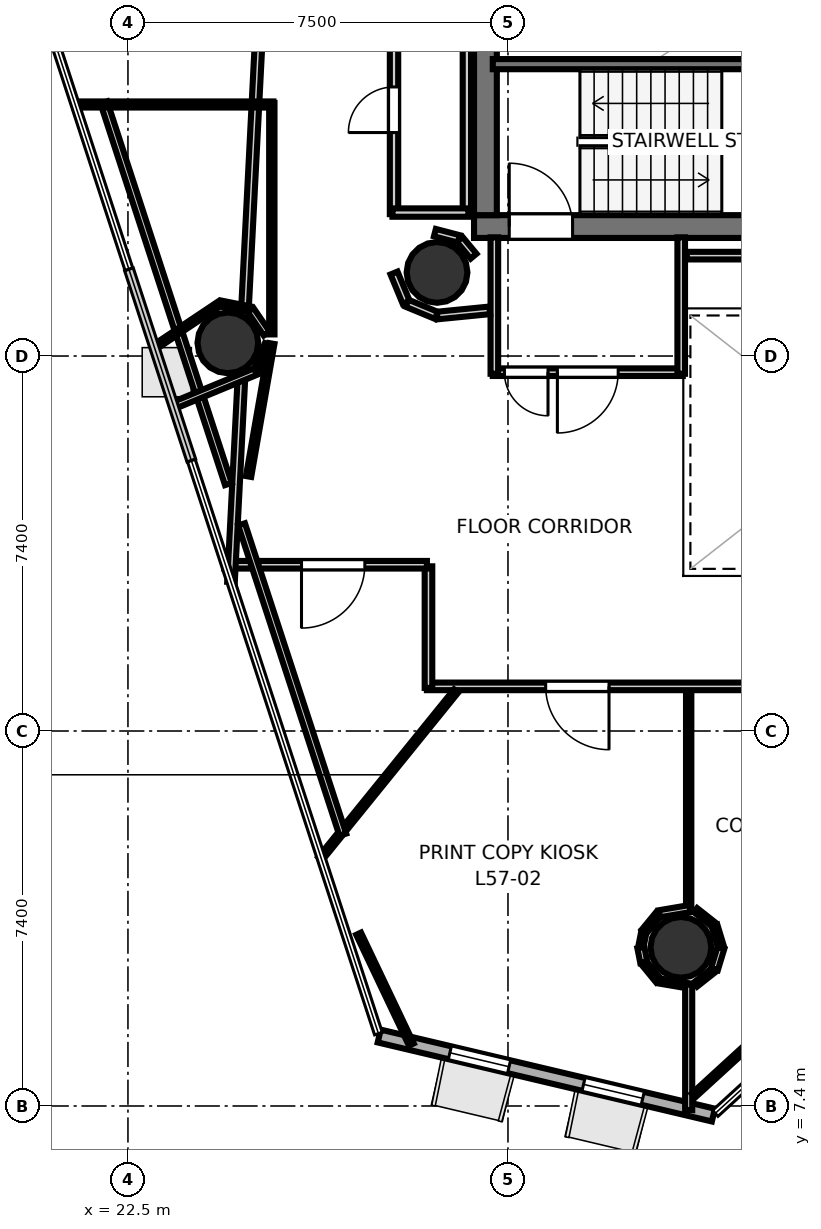
"""IFC4 building model, lengths in metres.
Left out: names, types, materials, properties, quantities, classifications, styles, units other than length and angle.
Written with IfcOpenShell. Run it as: python <this file> out.ifc"""

import sys

from ifc_helpers import new_model, si_unit, direction, frame, frame_2d, origin, origin_2d, place, context, subcontext, project, spatial, rectangle, hollow_circle, extrude, element, fill, save


model = new_model("IFC4")
c1 = context("Model", 3, precision=1e-05, world=origin(), true_north=direction((0.0, 1.0)))
c2 = subcontext(c1, "Body", "Model", "MODEL_VIEW")
j1 = project(units=[si_unit("LENGTHUNIT", "METRE"), si_unit("PLANEANGLEUNIT", "RADIAN")], contexts=[c1])
p1 = place(None, origin())
s1 = spatial("IfcSite", under=j1, at=p1, CompositionType="ELEMENT")
p2 = place(p1, origin())
s2 = spatial("IfcBuilding", under=s1, at=p2, CompositionType="ELEMENT")
p3 = place(p2, frame((0.0, 0.0, 222.5)))
s3 = spatial("IfcBuildingStorey", under=s2, at=p3, CompositionType="ELEMENT", Elevation=222.5)
p4 = place(p3, frame((29.33, 24.755, 0.0), z_axis=(0.0, 0.0, 1.0), x_axis=(1.0, 0.0, 0.0)))
e1 = element("IfcWall", 1, at=p4, inside=s3, PredefinedType="SHEAR", context=c2, shape_type="SweptSolid", body=[
    extrude(rectangle(XDim=10.52, YDim=0.45, at=frame_2d((5.26, 0.0))), origin(), (0.0, 0.0, 1.0), 3.52),
])
p5 = place(p4, frame((0.695, 0.0, 0.0)))
e2 = element("IfcOpeningElement", 2, at=p5, cuts=e1, PredefinedType="OPENING", context=c2, shape_type="SweptSolid", body=[
    extrude(rectangle(XDim=1.25, YDim=2.15, at=frame_2d((0.625, 1.075))), frame((0.0, 0.235, 0.0), z_axis=(0.0, -1.0, 0.0), x_axis=(1.0, 0.0, 0.0)), (0.0, 0.0, 1.0), 0.47),
])
p6 = place(p3, frame((29.555, 24.98, 0.0), z_axis=(0.0, 0.0, 1.0), x_axis=(0.0, 1.0, 0.0)))
e3 = element("IfcWall", 3, at=p6, inside=s3, PredefinedType="SHEAR", context=c2, shape_type="SweptSolid", body=[
    extrude(rectangle(XDim=7.44, YDim=0.45, at=frame_2d((3.72, 0.0))), origin(), (0.0, 0.0, 1.0), 3.52),
])
for number, where, z_axis, x_axis in (
    (4, (28.6, 23.85, 0.0), (0.0, 0.0, 1.0), (1.0, 0.0, 0.0)),
    (5, (24.472, 22.46, 0.0), (0.0, 0.0, 1.0), (1.0, 0.0, 0.0)),
    (6, (33.413, 10.531, 0.0), (0.0, 0.0, 1.0), (1.0, 0.0, 0.0)),
):
    element("IfcColumn", number, at=place(p3, frame(where, z_axis=z_axis, x_axis=x_axis)), inside=s3, PredefinedType="COLUMN", context=c2, shape_type="SweptSolid", body=[
        extrude(hollow_circle(Radius=0.6, WallThickness=0.03, at=origin_2d()), origin(), (0.0, 0.0, 1.0), 3.7),
    ])
p7 = place(p3, frame((27.459, 8.781, 0.0), z_axis=(0.0, 0.0, 1.0), x_axis=(0.973151464815, -0.230165650194, 0.0)))
e7 = element("IfcWall", 7, at=p7, inside=s3, PredefinedType="SOLIDWALL", context=c2, shape_type="SweptSolid", body=[
    extrude(rectangle(XDim=6.777, YDim=0.26, at=frame_2d((3.388, 0.0))), origin(), (0.0, 0.0, 1.0), 3.52),
])
p8 = place(p7, frame((1.433, 0.0, 0.9)))
e8 = element("IfcOpeningElement", 8, at=p8, cuts=e7, PredefinedType="OPENING", context=c2, shape_type="SweptSolid", body=[
    extrude(rectangle(XDim=1.2, YDim=2.0, at=frame_2d((0.6, 1.0))), frame((0.0, 0.14, 0.0), z_axis=(0.0, -1.0, 0.0), x_axis=(1.0, 0.0, 0.0)), (0.0, 0.0, 1.0), 0.28),
])
p9 = place(p7, frame((4.144, 0.0, 0.9)))
e9 = element("IfcOpeningElement", 9, at=p9, cuts=e7, PredefinedType="OPENING", context=c2, shape_type="SweptSolid", body=[
    extrude(rectangle(XDim=1.2, YDim=2.0, at=frame_2d((0.6, 1.0))), frame((0.0, 0.14, 0.0), z_axis=(0.0, -1.0, 0.0), x_axis=(1.0, 0.0, 0.0)), (0.0, 0.0, 1.0), 0.28),
])
p10 = place(p3, frame((29.7, 27.96, 0.0), z_axis=(0.0, 0.0, 1.0), x_axis=(1.0, 0.0, 0.0)))
e10 = element("IfcWall", 10, at=p10, inside=s3, PredefinedType="SOLIDWALL", context=c2, shape_type="SweptSolid", body=[
    extrude(rectangle(XDim=7.75, YDim=0.2, at=frame_2d((3.875, 0.0))), origin(), (0.0, 0.0, 1.0), 3.52),
])
p11 = place(p3, frame((33.45, 21.881, 0.0), z_axis=(0.0, 0.0, 1.0), x_axis=(-1.0, 0.0, 0.0)))
e11 = element("IfcWall", 11, at=p11, inside=s3, PredefinedType="PARTITIONING", context=c2, shape_type="SweptSolid", body=[
    extrude(rectangle(XDim=3.75, YDim=0.15, at=frame_2d((1.875, 0.0))), origin(), (0.0, 0.0, 1.0), 2.84),
])
p12 = place(p11, frame((1.275, 0.0, 0.0)))
e12 = element("IfcOpeningElement", 12, at=p12, cuts=e11, PredefinedType="OPENING", context=c2, shape_type="SweptSolid", body=[
    extrude(rectangle(XDim=1.2, YDim=2.15, at=frame_2d((0.6, 1.075))), frame((0.0, 0.085, 0.0), z_axis=(0.0, -1.0, 0.0), x_axis=(1.0, 0.0, 0.0)), (0.0, 0.0, 1.0), 0.17),
])
p13 = place(p11, frame((2.66, 0.0, 0.0)))
e13 = element("IfcOpeningElement", 13, at=p13, cuts=e11, PredefinedType="OPENING", context=c2, shape_type="SweptSolid", body=[
    extrude(rectangle(XDim=0.86, YDim=2.05, at=frame_2d((0.43, 1.025))), frame((0.0, 0.085, 0.0), z_axis=(0.0, -1.0, 0.0), x_axis=(1.0, 0.0, 0.0)), (0.0, 0.0, 1.0), 0.17),
])
for number, where, z_axis, x_axis in (
    (14, (29.731, 21.85, 0.0), (0.0, 0.0, 1.0), (0.0, 1.0, 0.0)),
    (15, (33.419, 24.542, 0.0), (0.0, 0.0, 1.0), (0.0, -1.0, 0.0)),
):
    element("IfcWall", number, at=place(p3, frame(where, z_axis=z_axis, x_axis=x_axis)), inside=s3, PredefinedType="PARTITIONING", context=c2, shape_type="SweptSolid", body=[
        extrude(rectangle(XDim=2.692, YDim=0.15, at=frame_2d((1.346, 0.0))), origin(), (0.0, 0.0, 1.0), 2.84),
    ])
p14 = place(p3, frame((27.751, 25.0, 0.0), z_axis=(0.0, 0.0, 1.0), x_axis=(0.0, 1.0, 0.0)))
e16 = element("IfcWall", 16, at=p14, inside=s3, PredefinedType="PLUMBINGWALL", context=c2, shape_type="SweptSolid", body=[
    extrude(rectangle(XDim=4.12, YDim=0.165, at=frame_2d((2.06, 0.0))), origin(), (0.0, 0.0, 1.0), 2.84),
])
p15 = place(p14, frame((1.61, 0.0, 0.0)))
e17 = element("IfcOpeningElement", 17, at=p15, cuts=e16, PredefinedType="OPENING", context=c2, shape_type="SweptSolid", body=[
    extrude(rectangle(XDim=0.9, YDim=2.1, at=frame_2d((0.45, 1.05))), frame((0.0, 0.093, 0.0), z_axis=(0.0, -1.0, 0.0), x_axis=(1.0, 0.0, 0.0)), (0.0, 0.0, 1.0), 0.185),
])
p16 = place(p3, frame((29.189, 29.12, 0.0), z_axis=(0.0, 0.0, 1.0), x_axis=(0.0, -1.0, 0.0)))
e18 = element("IfcWall", 18, at=p16, inside=s3, PredefinedType="PLUMBINGWALL", context=c2, shape_type="SweptSolid", body=[
    extrude(rectangle(XDim=4.12, YDim=0.165, at=frame_2d((2.06, 0.0))), origin(), (0.0, 0.0, 1.0), 2.84),
])
p17 = place(p3, frame((29.22, 25.031, 0.0), z_axis=(0.0, 0.0, 1.0), x_axis=(-1.0, 0.0, 0.0)))
e19 = element("IfcWall", 19, at=p17, inside=s3, PredefinedType="PLUMBINGWALL", context=c2, shape_type="SweptSolid", body=[
    extrude(rectangle(XDim=1.5, YDim=0.165, at=frame_2d((0.75, 0.0))), origin(), (0.0, 0.0, 1.0), 2.84),
])
p18 = place(p3, frame((29.321, 24.17, 0.0), z_axis=(0.0, 0.0, 1.0), x_axis=(-0.638008265708, 0.770029514296, 0.0)))
e20 = element("IfcWall", 20, at=p18, inside=s3, PredefinedType="PARTITIONING", context=c2, shape_type="SweptSolid", body=[
    extrude(rectangle(XDim=0.431, YDim=0.15, at=frame_2d((0.215, 0.0))), origin(), (0.0, 0.0, 1.0), 2.84),
])
p19 = place(p3, frame((29.03, 24.512, 0.0), z_axis=(0.0, 0.0, 1.0), x_axis=(-0.967681003213, 0.252177469296, 0.0)))
e21 = element("IfcWall", 21, at=p19, inside=s3, PredefinedType="PARTITIONING", context=c2, shape_type="SweptSolid", body=[
    extrude(rectangle(XDim=0.488, YDim=0.15, at=frame_2d((0.244, 0.0))), origin(), (0.0, 0.0, 1.0), 2.84),
])
p20 = place(p3, frame((37.703, 24.181, 0.0), z_axis=(0.0, 0.0, 1.0), x_axis=(-1.0, 0.0, 0.0)))
e22 = element("IfcWall", 22, at=p20, inside=s3, PredefinedType="PARTITIONING", context=c2, shape_type="SweptSolid", body=[
    extrude(rectangle(XDim=4.173, YDim=0.15, at=frame_2d((2.086, 0.0))), origin(), (0.0, 0.0, 1.0), 2.84),
])
for number, where, z_axis, x_axis in (
    (23, (27.751, 23.838, 0.0), (0.0, 0.0, 1.0), (0.382, -0.924, 0.0)),
    (24, (28.008, 23.241, 0.0), (0.0, 0.0, 1.0), (0.924, -0.382, 0.0)),
):
    element("IfcWall", number, at=place(p3, frame(where, z_axis=z_axis, x_axis=x_axis)), inside=s3, PredefinedType="PARTITIONING", context=c2, shape_type="SweptSolid", body=[
        extrude(rectangle(XDim=0.627, YDim=0.15, at=frame_2d((0.314, 0.0))), origin(), (0.0, 0.0, 1.0), 2.84),
    ])
p21 = place(p3, frame((28.603, 22.999, 0.0), z_axis=(0.0, 0.0, 1.0), x_axis=(0.995179827095, 0.098066873836, 0.0)))
e25 = element("IfcWall", 25, at=p21, inside=s3, PredefinedType="PARTITIONING", context=c2, shape_type="SweptSolid", body=[
    extrude(rectangle(XDim=1.043, YDim=0.15, at=frame_2d((0.521, 0.0))), origin(), (0.0, 0.0, 1.0), 2.84),
])
p22 = place(p3, frame((43.328, 15.681, 0.0), z_axis=(0.0, 0.0, 1.0), x_axis=(-1.0, 0.0, 0.0)))
e26 = element("IfcWall", 26, at=p22, inside=s3, PredefinedType="PARTITIONING", context=c2, shape_type="SweptSolid", body=[
    extrude(rectangle(XDim=14.928, YDim=0.15, at=frame_2d((7.464, 0.0))), origin(), (0.0, 0.0, 1.0), 2.84),
])
p23 = place(p22, frame((11.334, 0.0, 0.0)))
e27 = element("IfcOpeningElement", 27, at=p23, cuts=e26, PredefinedType="OPENING", context=c2, shape_type="SweptSolid", body=[
    extrude(rectangle(XDim=1.25, YDim=2.2, at=frame_2d((0.625, 1.1))), frame((0.0, 0.085, 0.0), z_axis=(0.0, -1.0, 0.0), x_axis=(1.0, 0.0, 0.0)), (0.0, 0.0, 1.0), 0.17),
])
p24 = place(p22, frame((4.655, 0.0, 0.0)))
e28 = element("IfcOpeningElement", 28, at=p24, cuts=e26, PredefinedType="OPENING", context=c2, shape_type="SweptSolid", body=[
    extrude(rectangle(XDim=1.25, YDim=2.2, at=frame_2d((0.625, 1.1))), frame((0.0, 0.085, 0.0), z_axis=(0.0, -1.0, 0.0), x_axis=(1.0, 0.0, 0.0)), (0.0, 0.0, 1.0), 0.17),
])
p25 = place(p3, frame((28.431, 15.65, 0.0), z_axis=(0.0, 0.0, 1.0), x_axis=(0.0, 1.0, 0.0)))
e29 = element("IfcWall", 29, at=p25, inside=s3, PredefinedType="PARTITIONING", context=c2, shape_type="SweptSolid", body=[
    extrude(rectangle(XDim=2.4, YDim=0.15, at=frame_2d((1.2, 0.0))), origin(), (0.0, 0.0, 1.0), 2.84),
])
p26 = place(p3, frame((28.4, 18.081, 0.0), z_axis=(0.0, 0.0, 1.0), x_axis=(-1.0, 0.0, 0.0)))
e30 = element("IfcWall", 30, at=p26, inside=s3, PredefinedType="PARTITIONING", context=c2, shape_type="SweptSolid", body=[
    extrude(rectangle(XDim=3.997, YDim=0.15, at=frame_2d((1.999, 0.0))), origin(), (0.0, 0.0, 1.0), 2.84),
])
p27 = place(p26, frame((1.225, 0.0, 0.0)))
e31 = element("IfcOpeningElement", 31, at=p27, cuts=e30, PredefinedType="OPENING", context=c2, shape_type="SweptSolid", body=[
    extrude(rectangle(XDim=1.25, YDim=2.2, at=frame_2d((0.625, 1.1))), frame((0.0, 0.085, 0.0), z_axis=(0.0, -1.0, 0.0), x_axis=(1.0, 0.0, 0.0)), (0.0, 0.0, 1.0), 0.17),
])
p28 = place(p3, frame((24.534, 17.741, 0.0), z_axis=(0.0, 0.0, 1.0), x_axis=(0.051059940586, 0.998695590492, 0.0)))
e32 = element("IfcWall", 32, at=p28, inside=s3, PredefinedType="PARTITIONING", context=c2, shape_type="SweptSolid", body=[
    extrude(rectangle(XDim=18.552, YDim=0.15, at=frame_2d((9.276, 0.0))), origin(), (0.0, 0.0, 1.0), 2.84),
])
p29 = place(p28, frame((13.051, 0.0, 0.0)))
e33 = element("IfcOpeningElement", 33, at=p29, cuts=e32, PredefinedType="OPENING", context=c2, shape_type="SweptSolid", body=[
    extrude(rectangle(XDim=1.25, YDim=2.2, at=frame_2d((0.625, 1.1))), frame((0.0, 0.085, 0.0), z_axis=(0.0, -1.0, 0.0), x_axis=(1.0, 0.0, 0.0)), (0.0, 0.0, 1.0), 0.17),
])
p30 = place(p3, frame((28.976, 15.59, 0.0), z_axis=(0.0, 0.0, 1.0), x_axis=(-0.629336859713, -0.777132625108, 0.0)))
e34 = element("IfcWall", 34, at=p30, inside=s3, PredefinedType="PARTITIONING", context=c2, shape_type="SweptSolid", body=[
    extrude(rectangle(XDim=4.255, YDim=0.105, at=frame_2d((2.127, 0.0))), origin(), (0.0, 0.0, 1.0), 2.84),
])
p31 = place(p3, frame((24.482, 19.674, 0.0), z_axis=(0.0, 0.0, 1.0), x_axis=(-0.310360293564, 0.950619002639, 0.0)))
e35 = element("IfcWall", 35, at=p31, inside=s3, PredefinedType="PARTITIONING", context=c2, shape_type="SweptSolid", body=[
    extrude(rectangle(XDim=7.922, YDim=0.14, at=frame_2d((3.961, 0.0))), origin(), (0.0, 0.0, 1.0), 2.84),
])
p32 = place(p3, frame((21.438, 27.164, 0.0), z_axis=(0.0, 0.0, 1.0), x_axis=(1.0, 0.0, 0.0)))
e36 = element("IfcWall", 36, at=p32, inside=s3, PredefinedType="PARTITIONING", context=c2, shape_type="SweptSolid", body=[
    extrude(rectangle(XDim=3.933, YDim=0.12, at=frame_2d((1.966, 0.0))), origin(), (0.0, 0.0, 1.0), 2.84),
])
p33 = place(p3, frame((25.339, 27.195, 0.0), z_axis=(0.0, 0.0, 1.0), x_axis=(0.0, -1.0, 0.0)))
e37 = element("IfcWall", 37, at=p33, inside=s3, PredefinedType="PARTITIONING", context=c2, shape_type="SweptSolid", body=[
    extrude(rectangle(XDim=4.568, YDim=0.105, at=frame_2d((2.284, 0.0))), origin(), (0.0, 0.0, 1.0), 2.84),
])
p34 = place(p3, frame((25.238, 22.644, 0.0), z_axis=(0.0, 0.0, 1.0), x_axis=(-0.563363697458, 0.826209019792, 0.0)))
e38 = element("IfcWall", 38, at=p34, inside=s3, PredefinedType="PARTITIONING", context=c2, shape_type="SweptSolid", body=[
    extrude(rectangle(XDim=0.564, YDim=0.14, at=frame_2d((0.282, 0.0))), origin(), (0.0, 0.0, 1.0), 2.84),
])
p35 = place(p3, frame((24.9, 23.122, 0.0), z_axis=(0.0, 0.0, 1.0), x_axis=(-0.980773892286, 0.195147565217, 0.0)))
e39 = element("IfcWall", 39, at=p35, inside=s3, PredefinedType="PARTITIONING", context=c2, shape_type="SweptSolid", body=[
    extrude(rectangle(XDim=0.582, YDim=0.12, at=frame_2d((0.291, 0.0))), origin(), (0.0, 0.0, 1.0), 2.84),
])
p36 = place(p3, frame((24.306, 23.231, 0.0), z_axis=(0.0, 0.0, 1.0), x_axis=(-0.831401909313, -0.555671544341, 0.0)))
e40 = element("IfcWall", 40, at=p36, inside=s3, PredefinedType="PARTITIONING", context=c2, shape_type="SweptSolid", body=[
    extrude(rectangle(XDim=1.565, YDim=0.105, at=frame_2d((0.783, 0.0))), origin(), (0.0, 0.0, 1.0), 2.84),
])
p37 = place(p3, frame((23.379, 21.214, 0.0), z_axis=(0.0, 0.0, 1.0), x_axis=(0.923851107416, 0.382752049408, 0.0)))
e41 = element("IfcWall", 41, at=p37, inside=s3, PredefinedType="PARTITIONING", context=c2, shape_type="SweptSolid", body=[
    extrude(rectangle(XDim=1.778, YDim=0.14, at=frame_2d((0.889, 0.0))), origin(), (0.0, 0.0, 1.0), 2.84),
])
p38 = place(p3, frame((25.038, 21.91, 0.0), z_axis=(0.0, 0.0, 1.0), x_axis=(0.389093528864, 0.921198255424, 0.0)))
e42 = element("IfcWall", 42, at=p38, inside=s3, PredefinedType="PARTITIONING", context=c2, shape_type="SweptSolid", body=[
    extrude(rectangle(XDim=0.568, YDim=0.12, at=frame_2d((0.284, 0.0))), origin(), (0.0, 0.0, 1.0), 2.84),
])
p39 = place(p3, frame((25.339, 22.446, 0.0), z_axis=(0.0, 0.0, 1.0), x_axis=(-0.172226916482, -0.985057302516, 0.0)))
e43 = element("IfcWall", 43, at=p39, inside=s3, PredefinedType="PARTITIONING", context=c2, shape_type="SweptSolid", body=[
    extrude(rectangle(XDim=2.664, YDim=0.105, at=frame_2d((1.332, 0.0))), origin(), (0.0, 0.0, 1.0), 2.84),
])
p40 = place(p3, frame((33.566, 15.57, 0.0), z_axis=(0.0, 0.0, 1.0), x_axis=(0.0, -1.0, 0.0)))
e44 = element("IfcWall", 44, at=p40, inside=s3, PredefinedType="PARTITIONING", context=c2, shape_type="SweptSolid", body=[
    extrude(rectangle(XDim=4.305, YDim=0.105, at=frame_2d((2.152, 0.0))), origin(), (0.0, 0.0, 1.0), 2.84),
])
p41 = place(p3, frame((33.592, 11.296, 0.0), z_axis=(0.0, 0.0, 1.0), x_axis=(-0.986004987634, -0.166715819165, 0.0)))
e45 = element("IfcWall", 45, at=p41, inside=s3, PredefinedType="PARTITIONING", context=c2, shape_type="SweptSolid", body=[
    extrude(rectangle(XDim=0.615, YDim=0.14, at=frame_2d((0.308, 0.0))), origin(), (0.0, 0.0, 1.0), 2.84),
])
p42 = place(p3, frame((32.967, 11.183, 0.0), z_axis=(0.0, 0.0, 1.0), x_axis=(-0.634231799198, -0.773142952426, 0.0)))
e46 = element("IfcWall", 46, at=p42, inside=s3, PredefinedType="PARTITIONING", context=c2, shape_type="SweptSolid", body=[
    extrude(rectangle(XDim=0.441, YDim=0.12, at=frame_2d((0.221, 0.0))), origin(), (0.0, 0.0, 1.0), 2.84),
])
p43 = place(p3, frame((32.68, 10.828, 0.0), z_axis=(0.0, 0.0, 1.0), x_axis=(-0.19516586844, -0.980770250261, 0.0)))
e47 = element("IfcWall", 47, at=p43, inside=s3, PredefinedType="PARTITIONING", context=c2, shape_type="SweptSolid", body=[
    extrude(rectangle(XDim=0.296, YDim=0.105, at=frame_2d((0.148, 0.0))), origin(), (0.0, 0.0, 1.0), 2.84),
])
p44 = place(p3, frame((32.623, 10.525, 0.0), z_axis=(0.0, 0.0, 1.0), x_axis=(0.19516586844, -0.980770250261, 0.0)))
e48 = element("IfcWall", 48, at=p44, inside=s3, PredefinedType="PARTITIONING", context=c2, shape_type="SweptSolid", body=[
    extrude(rectangle(XDim=0.296, YDim=0.14, at=frame_2d((0.148, 0.0))), origin(), (0.0, 0.0, 1.0), 2.84),
])
p45 = place(p3, frame((32.687, 10.22, 0.0), z_axis=(0.0, 0.0, 1.0), x_axis=(0.634231799198, -0.773142952426, 0.0)))
e49 = element("IfcWall", 49, at=p45, inside=s3, PredefinedType="PARTITIONING", context=c2, shape_type="SweptSolid", body=[
    extrude(rectangle(XDim=0.441, YDim=0.12, at=frame_2d((0.221, 0.0))), origin(), (0.0, 0.0, 1.0), 2.84),
])
p46 = place(p3, frame((32.986, 9.868, 0.0), z_axis=(0.0, 0.0, 1.0), x_axis=(0.986004987634, -0.166715819165, 0.0)))
e50 = element("IfcWall", 50, at=p46, inside=s3, PredefinedType="PARTITIONING", context=c2, shape_type="SweptSolid", body=[
    extrude(rectangle(XDim=0.615, YDim=0.105, at=frame_2d((0.308, 0.0))), origin(), (0.0, 0.0, 1.0), 2.84),
])
p47 = place(p3, frame((33.566, 9.796, 0.0), z_axis=(0.0, 0.0, 1.0), x_axis=(0.0, -1.0, 0.0)))
e51 = element("IfcWall", 51, at=p47, inside=s3, PredefinedType="PARTITIONING", context=c2, shape_type="SweptSolid", body=[
    extrude(rectangle(XDim=2.48, YDim=0.14, at=frame_2d((1.24, 0.0))), origin(), (0.0, 0.0, 1.0), 2.84),
])
p48 = place(p3, frame((28.093, 8.613, 0.0), z_axis=(0.0, 0.0, 1.0), x_axis=(-0.429835776359, 0.902907085675, 0.0)))
e52 = element("IfcWall", 52, at=p48, inside=s3, PredefinedType="PARTITIONING", context=c2, shape_type="SweptSolid", body=[
    extrude(rectangle(XDim=2.422, YDim=0.105, at=frame_2d((1.211, 0.0))), origin(), (0.0, 0.0, 1.0), 2.84),
])
p49 = place(p3, frame((33.7, 9.798, 0.0), z_axis=(0.0, 0.0, 1.0), x_axis=(0.785219888975, 0.619217026541, 0.0)))
e53 = element("IfcWall", 53, at=p49, inside=s3, PredefinedType="PARTITIONING", context=c2, shape_type="SweptSolid", body=[
    extrude(rectangle(XDim=0.463, YDim=0.105, at=frame_2d((0.232, 0.0))), origin(), (0.0, 0.0, 1.0), 2.84),
])
p50 = place(p3, frame((34.075, 10.1, 0.0), z_axis=(0.0, 0.0, 1.0), x_axis=(0.290038119708, 0.957015093463, 0.0)))
e54 = element("IfcWall", 54, at=p50, inside=s3, PredefinedType="PARTITIONING", context=c2, shape_type="SweptSolid", body=[
    extrude(rectangle(XDim=0.441, YDim=0.14, at=frame_2d((0.221, 0.0))), origin(), (0.0, 0.0, 1.0), 2.84),
])
p51 = place(p3, frame((34.203, 10.54, 0.0), z_axis=(0.0, 0.0, 1.0), x_axis=(-0.290038119708, 0.957015093463, 0.0)))
e55 = element("IfcWall", 55, at=p51, inside=s3, PredefinedType="PARTITIONING", context=c2, shape_type="SweptSolid", body=[
    extrude(rectangle(XDim=0.441, YDim=0.12, at=frame_2d((0.221, 0.0))), origin(), (0.0, 0.0, 1.0), 2.84),
])
p52 = place(p3, frame((34.064, 10.978, 0.0), z_axis=(0.0, 0.0, 1.0), x_axis=(-0.785219888975, 0.619217026541, 0.0)))
e56 = element("IfcWall", 56, at=p52, inside=s3, PredefinedType="PARTITIONING", context=c2, shape_type="SweptSolid", body=[
    extrude(rectangle(XDim=0.463, YDim=0.105, at=frame_2d((0.232, 0.0))), origin(), (0.0, 0.0, 1.0), 2.84),
])
p53 = place(p3, frame((42.396, 15.593, 0.0), z_axis=(0.0, 0.0, 1.0), x_axis=(-0.738061977913, -0.67473292254, 0.0)))
e57 = element("IfcWall", 57, at=p53, inside=s3, PredefinedType="PARTITIONING", context=c2, shape_type="SweptSolid", body=[
    extrude(rectangle(XDim=11.835, YDim=0.105, at=frame_2d((5.917, 0.0))), origin(), (0.0, 0.0, 1.0), 2.84),
])
p54 = place(p3, frame((26.741, 12.754, 0.0), z_axis=(0.0, 0.0, 1.0), x_axis=(-0.310309524014, 0.950635576499, 0.0)))
e58 = element("IfcWall", 58, at=p54, inside=s3, PredefinedType="PARTITIONING", context=c2, shape_type="SweptSolid", body=[
    extrude(rectangle(XDim=6.442, YDim=0.14, at=frame_2d((3.221, 0.0))), origin(), (0.0, 0.0, 1.0), 2.84),
])
p55 = place(p5, origin())
e59 = element("IfcDoor", 59, at=p55, inside=s3, OperationType="SINGLE_SWING_LEFT", PredefinedType="DOOR", context=c2, shape_type="SweptSolid", body=[
    extrude(rectangle(XDim=1.25, YDim=2.15, at=frame_2d((0.625, 1.075))), frame((0.0, 0.025, 0.0), z_axis=(0.0, -1.0, 0.0), x_axis=(1.0, 0.0, 0.0)), (0.0, 0.0, 1.0), 0.05),
])
fill(e2, e59)
p56 = place(p12, origin())
e60 = element("IfcDoor", 60, at=p56, inside=s3, OperationType="SINGLE_SWING_RIGHT", PredefinedType="DOOR", context=c2, shape_type="SweptSolid", body=[
    extrude(rectangle(XDim=1.2, YDim=2.15, at=frame_2d((0.6, 1.075))), frame((0.0, 0.025, 0.0), z_axis=(0.0, -1.0, 0.0), x_axis=(1.0, 0.0, 0.0)), (0.0, 0.0, 1.0), 0.05),
])
fill(e12, e60)
p57 = place(p15, origin())
e61 = element("IfcDoor", 61, at=p57, inside=s3, OperationType="SINGLE_SWING_LEFT", PredefinedType="DOOR", context=c2, shape_type="SweptSolid", body=[
    extrude(rectangle(XDim=0.9, YDim=2.1, at=frame_2d((0.45, 1.05))), frame((0.0, 0.025, 0.0), z_axis=(0.0, -1.0, 0.0), x_axis=(1.0, 0.0, 0.0)), (0.0, 0.0, 1.0), 0.05),
])
fill(e17, e61)
p58 = place(p13, origin())
e62 = element("IfcDoor", 62, at=p58, inside=s3, OperationType="SINGLE_SWING_LEFT", PredefinedType="DOOR", context=c2, shape_type="SweptSolid", body=[
    extrude(rectangle(XDim=0.86, YDim=2.05, at=frame_2d((0.43, 1.025))), frame((0.0, 0.025, 0.0), z_axis=(0.0, -1.0, 0.0), x_axis=(1.0, 0.0, 0.0)), (0.0, 0.0, 1.0), 0.05),
])
fill(e13, e62)
p59 = place(p27, origin())
e63 = element("IfcDoor", 63, at=p59, inside=s3, OperationType="SINGLE_SWING_RIGHT", PredefinedType="DOOR", context=c2, shape_type="SweptSolid", body=[
    extrude(rectangle(XDim=1.25, YDim=2.2, at=frame_2d((0.625, 1.1))), frame((0.0, 0.025, 0.0), z_axis=(0.0, -1.0, 0.0), x_axis=(1.0, 0.0, 0.0)), (0.0, 0.0, 1.0), 0.05),
])
fill(e31, e63)
p60 = place(p23, origin())
e64 = element("IfcDoor", 64, at=p60, inside=s3, OperationType="SINGLE_SWING_LEFT", PredefinedType="DOOR", context=c2, shape_type="SweptSolid", body=[
    extrude(rectangle(XDim=1.25, YDim=2.2, at=frame_2d((0.625, 1.1))), frame((0.0, 0.025, 0.0), z_axis=(0.0, -1.0, 0.0), x_axis=(1.0, 0.0, 0.0)), (0.0, 0.0, 1.0), 0.05),
])
fill(e27, e64)
p61 = place(p8, origin())
e65 = element("IfcWindow", 65, at=p61, inside=s3, PartitioningType="SINGLE_PANEL", PredefinedType="WINDOW", context=c2, shape_type="SweptSolid", body=[
    extrude(rectangle(XDim=1.2, YDim=2.0, at=frame_2d((0.6, 1.0))), frame((0.0, 0.03, 0.0), z_axis=(0.0, -1.0, 0.0), x_axis=(1.0, 0.0, 0.0)), (0.0, 0.0, 1.0), 0.06),
])
fill(e8, e65)
p62 = place(p9, origin())
e66 = element("IfcWindow", 66, at=p62, inside=s3, PartitioningType="SINGLE_PANEL", PredefinedType="WINDOW", context=c2, shape_type="SweptSolid", body=[
    extrude(rectangle(XDim=1.2, YDim=2.0, at=frame_2d((0.6, 1.0))), frame((0.0, 0.03, 0.0), z_axis=(0.0, -1.0, 0.0), x_axis=(1.0, 0.0, 0.0)), (0.0, 0.0, 1.0), 0.06),
])
fill(e9, e66)
save(model, sys.argv[1])
